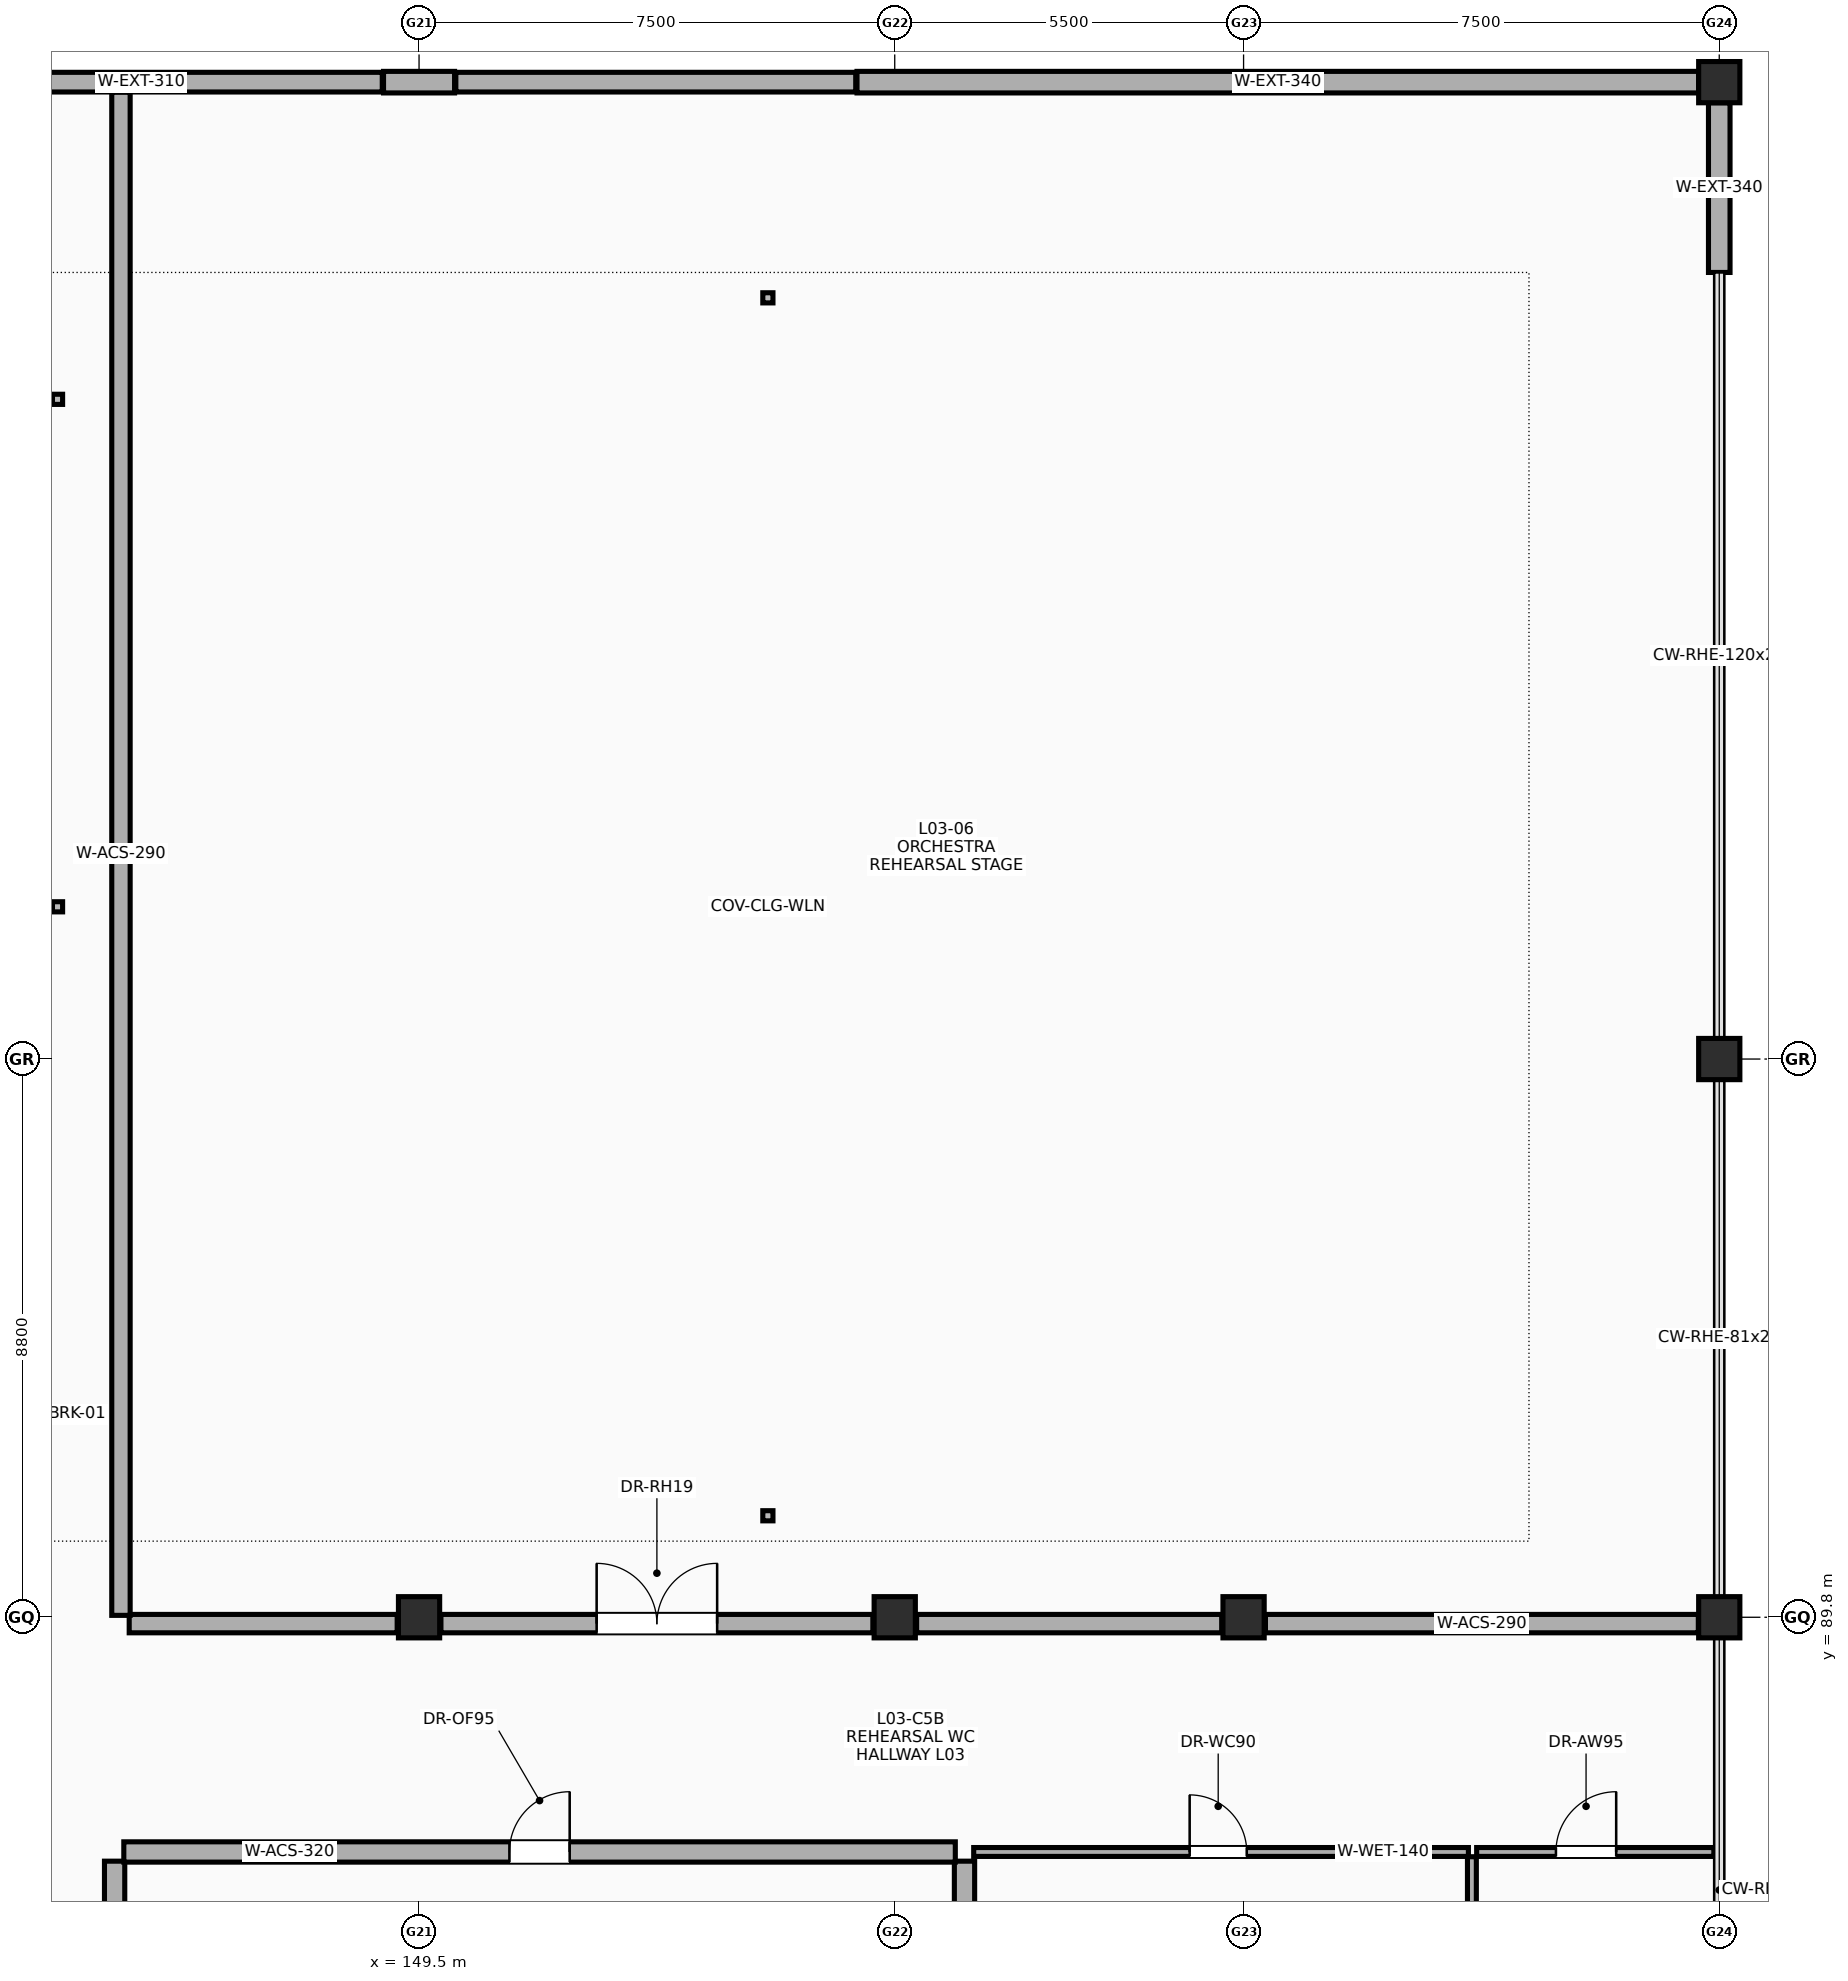
"""IFC4 building model, lengths in metres.
Left out: names, types, materials, properties, quantities, classifications, styles, units other than length and angle.
Written with IfcOpenShell. Run it as: python <this file> out.ifc"""

import sys

from ifc_helpers import new_model, si_unit, direction, frame, frame_2d, origin, origin_2d, place, context, subcontext, project, spatial, rectangle, extrude, element, fill, save


model = new_model("IFC4")
c1 = context("Model", 3, precision=1e-05, world=origin(), true_north=direction((0.0, 1.0)))
c2 = subcontext(c1, "Body", "Model", "MODEL_VIEW")
j1 = project(units=[si_unit("LENGTHUNIT", "METRE"), si_unit("PLANEANGLEUNIT", "RADIAN")], contexts=[c1])
p1 = place(None, origin())
s1 = spatial("IfcSite", under=j1, at=p1, CompositionType="ELEMENT")
p2 = place(p1, origin())
s2 = spatial("IfcBuilding", under=s1, at=p2, CompositionType="ELEMENT")
p3 = place(p2, frame((0.0, 0.0, 14.2)))
s3 = spatial("IfcBuildingStorey", under=s2, at=p3, CompositionType="ELEMENT", Elevation=14.2)
for number, where, z_axis, x_axis in (
    (1, (149.5, 89.8, 0.0), (0.0, 0.0, 1.0), (1.0, 0.0, 0.0)),
    (2, (157.0, 89.8, 0.0), (0.0, 0.0, 1.0), (1.0, 0.0, 0.0)),
    (3, (162.5, 89.8, 0.0), (0.0, 0.0, 1.0), (1.0, 0.0, 0.0)),
    (4, (170.0, 89.8, 0.0), (0.0, 0.0, 1.0), (1.0, 0.0, 0.0)),
    (5, (170.0, 98.6, 0.0), (0.0, 0.0, 1.0), (1.0, 0.0, 0.0)),
    (6, (170.0, 114.0, 0.0), (0.0, 0.0, 1.0), (1.0, 0.0, 0.0)),
):
    element("IfcColumn", number, at=place(p3, frame(where, z_axis=z_axis, x_axis=x_axis)), inside=s3, PredefinedType="COLUMN", context=c2, shape_type="SweptSolid", body=[
        extrude(rectangle(XDim=0.65, YDim=0.65, at=origin_2d()), origin(), (0.0, 0.0, 1.0), 3.8),
    ])
p4 = place(p3, frame((141.325, 114.0, 0.0), z_axis=(0.0, 0.0, 1.0), x_axis=(1.0, 0.0, 0.0)))
e7 = element("IfcWall", 7, at=p4, inside=s3, PredefinedType="SOLIDWALL", context=c2, shape_type="SweptSolid", body=[
    extrude(rectangle(XDim=7.595, YDim=0.31, at=frame_2d((3.797, 0.0))), origin(), (0.0, 0.0, 1.0), 2.3),
])
p5 = place(p3, frame((170.0, 111.0, 0.0), z_axis=(0.0, 0.0, 1.0), x_axis=(0.0, 1.0, 0.0)))
e8 = element("IfcWall", 8, at=p5, inside=s3, PredefinedType="SOLIDWALL", context=c2, shape_type="SweptSolid", body=[
    extrude(rectangle(XDim=2.675, YDim=0.34, at=frame_2d((1.337, 0.0))), origin(), (0.0, 0.0, 1.0), 2.3),
])
p6 = place(p3, frame((156.405, 114.0, 0.0), z_axis=(0.0, 0.0, 1.0), x_axis=(1.0, 0.0, 0.0)))
e9 = element("IfcWall", 9, at=p6, inside=s3, PredefinedType="SOLIDWALL", context=c2, shape_type="SweptSolid", body=[
    extrude(rectangle(XDim=13.27, YDim=0.34, at=frame_2d((6.635, 0.0))), origin(), (0.0, 0.0, 1.0), 2.3),
])
p7 = place(p3, frame((149.845, 89.7, 0.0), z_axis=(0.0, 0.0, 1.0), x_axis=(1.0, 0.0, 0.0)))
e10 = element("IfcWall", 10, at=p7, inside=s3, PredefinedType="PARTITIONING", context=c2, shape_type="SweptSolid", body=[
    extrude(rectangle(XDim=6.81, YDim=0.29, at=frame_2d((3.405, 0.0))), origin(), (0.0, 0.0, 1.0), 2.7),
])
p8 = place(p7, frame((2.455, 0.0, 0.0)))
e11 = element("IfcOpeningElement", 11, at=p8, cuts=e10, PredefinedType="OPENING", context=c2, shape_type="SweptSolid", body=[
    extrude(rectangle(XDim=1.9, YDim=2.35, at=frame_2d((0.95, 1.175))), frame((0.0, 0.155, 0.0), z_axis=(0.0, -1.0, 0.0), x_axis=(1.0, 0.0, 0.0)), (0.0, 0.0, 1.0), 0.31),
])
p9 = place(p3, frame((162.845, 89.7, 0.0), z_axis=(0.0, 0.0, 1.0), x_axis=(1.0, 0.0, 0.0)))
e12 = element("IfcWall", 12, at=p9, inside=s3, PredefinedType="PARTITIONING", context=c2, shape_type="SweptSolid", body=[
    extrude(rectangle(XDim=6.825, YDim=0.29, at=frame_2d((3.413, 0.0))), origin(), (0.0, 0.0, 1.0), 2.7),
])
p10 = place(p3, frame((157.345, 89.7, 0.0), z_axis=(0.0, 0.0, 1.0), x_axis=(1.0, 0.0, 0.0)))
e13 = element("IfcWall", 13, at=p10, inside=s3, PredefinedType="PARTITIONING", context=c2, shape_type="SweptSolid", body=[
    extrude(rectangle(XDim=4.81, YDim=0.29, at=frame_2d((2.405, 0.0))), origin(), (0.0, 0.0, 1.0), 2.9),
])
p11 = place(p3, frame((144.93, 89.7, 0.0), z_axis=(0.0, 0.0, 1.0), x_axis=(1.0, 0.0, 0.0)))
e14 = element("IfcWall", 14, at=p11, inside=s3, PredefinedType="PARTITIONING", context=c2, shape_type="SweptSolid", body=[
    extrude(rectangle(XDim=4.225, YDim=0.29, at=frame_2d((2.113, 0.0))), origin(), (0.0, 0.0, 1.0), 2.7),
])
p12 = place(p3, frame((158.1, 72.775, 0.0), z_axis=(0.0, 0.0, 1.0), x_axis=(0.0, 1.0, 0.0)))
e15 = element("IfcWall", 15, at=p12, inside=s3, PredefinedType="PARTITIONING", context=c2, shape_type="SweptSolid", body=[
    extrude(rectangle(XDim=13.18, YDim=0.32, at=frame_2d((6.59, 0.0))), origin(), (0.0, 0.0, 1.0), 2.747),
])
p13 = place(p3, frame((144.7, 81.8, 0.0), z_axis=(0.0, 0.0, 1.0), x_axis=(0.0, 1.0, 0.0)))
e16 = element("IfcWall", 16, at=p13, inside=s3, PredefinedType="PARTITIONING", context=c2, shape_type="SweptSolid", body=[
    extrude(rectangle(XDim=4.155, YDim=0.32, at=frame_2d((2.078, 0.0))), origin(), (0.0, 0.0, 1.0), 3.5),
])
p14 = place(p13, frame((1.625, 0.0, 0.0)))
e17 = element("IfcOpeningElement", 17, at=p14, cuts=e16, PredefinedType="OPENING", context=c2, shape_type="SweptSolid", body=[
    extrude(rectangle(XDim=0.95, YDim=2.15, at=frame_2d((0.475, 1.075))), frame((0.0, 0.17, 0.0), z_axis=(0.0, -1.0, 0.0), x_axis=(1.0, 0.0, 0.0)), (0.0, 0.0, 1.0), 0.34),
])
p15 = place(p3, frame((144.845, 86.1, 0.0), z_axis=(0.0, 0.0, 1.0), x_axis=(1.0, 0.0, 0.0)))
e18 = element("IfcWall", 18, at=p15, inside=s3, PredefinedType="PARTITIONING", context=c2, shape_type="SweptSolid", body=[
    extrude(rectangle(XDim=13.11, YDim=0.32, at=frame_2d((6.555, 0.0))), origin(), (0.0, 0.0, 1.0), 2.9),
])
p16 = place(p15, frame((6.08, 0.0, 0.0)))
e19 = element("IfcOpeningElement", 19, at=p16, cuts=e18, PredefinedType="OPENING", context=c2, shape_type="SweptSolid", body=[
    extrude(rectangle(XDim=0.95, YDim=2.15, at=frame_2d((0.475, 1.075))), frame((0.0, 0.17, 0.0), z_axis=(0.0, -1.0, 0.0), x_axis=(1.0, 0.0, 0.0)), (0.0, 0.0, 1.0), 0.34),
])
p17 = place(p3, frame((166.1, 79.455, 0.0), z_axis=(0.0, 0.0, 1.0), x_axis=(0.0, 1.0, 0.0)))
e20 = element("IfcWall", 20, at=p17, inside=s3, PredefinedType="PARTITIONING", context=c2, shape_type="SweptSolid", body=[
    extrude(rectangle(XDim=6.57, YDim=0.14, at=frame_2d((3.285, 0.0))), origin(), (0.0, 0.0, 1.0), 2.747),
])
p18 = place(p3, frame((158.245, 86.1, 0.0), z_axis=(0.0, 0.0, 1.0), x_axis=(1.0, 0.0, 0.0)))
e21 = element("IfcWall", 21, at=p18, inside=s3, PredefinedType="PARTITIONING", context=c2, shape_type="SweptSolid", body=[
    extrude(rectangle(XDim=7.8, YDim=0.14, at=frame_2d((3.9, 0.0))), origin(), (0.0, 0.0, 1.0), 2.9),
])
p19 = place(p18, frame((3.405, 0.0, 0.0)))
e22 = element("IfcOpeningElement", 22, at=p19, cuts=e21, PredefinedType="OPENING", context=c2, shape_type="SweptSolid", body=[
    extrude(rectangle(XDim=0.9, YDim=2.1, at=frame_2d((0.45, 1.05))), frame((0.0, 0.08, 0.0), z_axis=(0.0, -1.0, 0.0), x_axis=(1.0, 0.0, 0.0)), (0.0, 0.0, 1.0), 0.16),
])
p20 = place(p3, frame((166.175, 86.1, 0.0), z_axis=(0.0, 0.0, 1.0), x_axis=(1.0, 0.0, 0.0)))
e23 = element("IfcWall", 23, at=p20, inside=s3, PredefinedType="PARTITIONING", context=c2, shape_type="SweptSolid", body=[
    extrude(rectangle(XDim=3.74, YDim=0.14, at=frame_2d((1.87, 0.0))), origin(), (0.0, 0.0, 1.0), 2.7),
])
p21 = place(p20, frame((1.25, 0.0, 0.0)))
e24 = element("IfcOpeningElement", 24, at=p21, cuts=e23, PredefinedType="OPENING", context=c2, shape_type="SweptSolid", body=[
    extrude(rectangle(XDim=0.95, YDim=2.1, at=frame_2d((0.475, 1.05))), frame((0.0, 0.08, 0.0), z_axis=(0.0, -1.0, 0.0), x_axis=(1.0, 0.0, 0.0)), (0.0, 0.0, 1.0), 0.16),
])
p22 = place(p3, frame((144.8, 89.83, 0.0), z_axis=(0.0, 0.0, 1.0), x_axis=(0.0, 1.0, 0.0)))
e25 = element("IfcWall", 25, at=p22, inside=s3, PredefinedType="PARTITIONING", context=c2, shape_type="SweptSolid", body=[
    extrude(rectangle(XDim=24.01, YDim=0.29, at=frame_2d((12.005, 0.0))), origin(), (0.0, 0.0, 1.0), 2.3),
])
p23 = place(p3, frame((150.08, 114.0, 0.0), z_axis=(0.0, 0.0, 1.0), x_axis=(1.0, 0.0, 0.0)))
e26 = element("IfcWall", 26, at=p23, inside=s3, PredefinedType="SOLIDWALL", context=c2, shape_type="SweptSolid", body=[
    extrude(rectangle(XDim=6.305, YDim=0.31, at=frame_2d((3.152, 0.0))), origin(), (0.0, 0.0, 1.0), 2.3),
])
p24 = place(p3, frame((148.94, 114.0, 0.0), z_axis=(0.0, 0.0, 1.0), x_axis=(1.0, 0.0, 0.0)))
e27 = element("IfcWall", 27, at=p24, inside=s3, PredefinedType="SOLIDWALL", context=c2, shape_type="SweptSolid", body=[
    extrude(rectangle(XDim=1.12, YDim=0.34, at=frame_2d((0.56, 0.0))), origin(), (0.0, 0.0, 1.0), 2.3),
])
p25 = place(p8, origin())
e28 = element("IfcDoor", 28, at=p25, inside=s3, OperationType="DOUBLE_DOOR_SINGLE_SWING", PredefinedType="DOOR", context=c2, shape_type="SweptSolid", body=[
    extrude(rectangle(XDim=1.9, YDim=2.35, at=frame_2d((0.95, 1.175))), frame((0.0, 0.025, 0.0), z_axis=(0.0, -1.0, 0.0), x_axis=(1.0, 0.0, 0.0)), (0.0, 0.0, 1.0), 0.05),
])
fill(e11, e28)
p26 = place(p16, origin())
e29 = element("IfcDoor", 29, at=p26, inside=s3, OperationType="SINGLE_SWING_RIGHT", PredefinedType="DOOR", context=c2, shape_type="SweptSolid", body=[
    extrude(rectangle(XDim=0.95, YDim=2.15, at=frame_2d((0.475, 1.075))), frame((0.0, 0.025, 0.0), z_axis=(0.0, -1.0, 0.0), x_axis=(1.0, 0.0, 0.0)), (0.0, 0.0, 1.0), 0.05),
])
fill(e19, e29)
p27 = place(p19, origin())
e30 = element("IfcDoor", 30, at=p27, inside=s3, OperationType="SINGLE_SWING_LEFT", PredefinedType="DOOR", context=c2, shape_type="SweptSolid", body=[
    extrude(rectangle(XDim=0.9, YDim=2.1, at=frame_2d((0.45, 1.05))), frame((0.0, 0.025, 0.0), z_axis=(0.0, -1.0, 0.0), x_axis=(1.0, 0.0, 0.0)), (0.0, 0.0, 1.0), 0.05),
])
fill(e22, e30)
p28 = place(p21, origin())
e31 = element("IfcDoor", 31, at=p28, inside=s3, OperationType="SINGLE_SWING_RIGHT", PredefinedType="DOOR", context=c2, shape_type="SweptSolid", body=[
    extrude(rectangle(XDim=0.95, YDim=2.1, at=frame_2d((0.475, 1.05))), frame((0.0, 0.025, 0.0), z_axis=(0.0, -1.0, 0.0), x_axis=(1.0, 0.0, 0.0)), (0.0, 0.0, 1.0), 0.05),
])
fill(e24, e31)
save(model, sys.argv[1])
